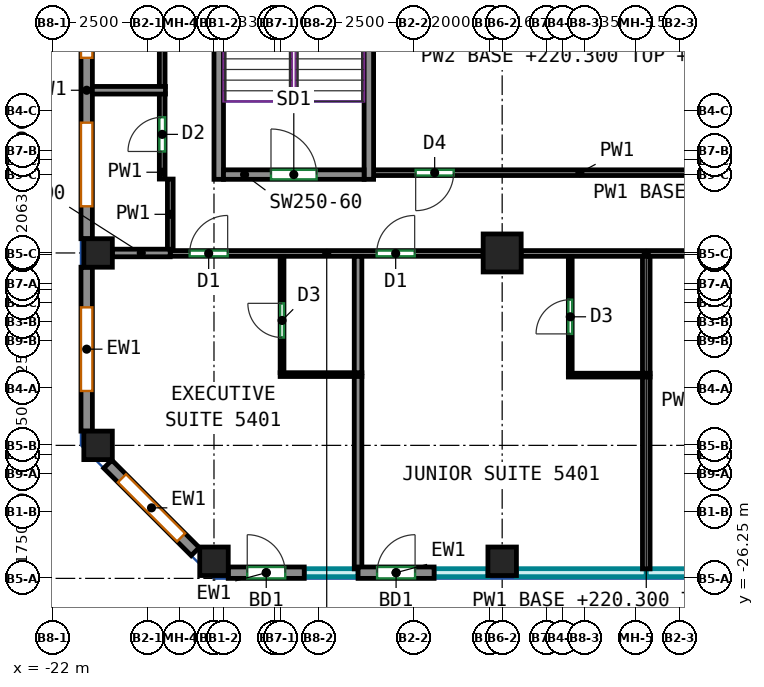
"""IFC4 building model, lengths in metres.
Left out: names, types, materials, properties, quantities, classifications, styles, units other than length and angle.
Written with IfcOpenShell. Run it as: python <this file> out.ifc"""

import sys

from ifc_helpers import new_model, si_unit, direction, frame, frame_2d, origin, origin_2d, place, context, subcontext, project, spatial, rectangle, extrude, source, transform, mapped, element, fill, save


model = new_model("IFC4")
c1 = context("Model", 3, precision=1e-05, world=origin(), true_north=direction((0.0, 1.0)))
c2 = subcontext(c1, "Body", "Model", "MODEL_VIEW")
j1 = project(units=[si_unit("LENGTHUNIT", "METRE"), si_unit("PLANEANGLEUNIT", "RADIAN")], contexts=[c1])
p1 = place(None, origin())
s1 = spatial("IfcSite", under=j1, at=p1, CompositionType="ELEMENT")
p2 = place(p1, origin())
s2 = spatial("IfcBuilding", under=s1, at=p2, CompositionType="ELEMENT")
p3 = place(p2, frame((0.0, 0.0, 220.3)))
s3 = spatial("IfcBuildingStorey", under=s2, at=p3, CompositionType="ELEMENT", Elevation=220.3)
m1 = source(origin(), c2, "Body", "SweptSolid", [
    extrude(rectangle(XDim=0.75, YDim=0.75, at=origin_2d()), origin(), (0.0, 0.0, 1.0), 3.0),
])
for number, where, z_axis, x_axis in (
    (1, (-20.8, -22.75, 0.0), (0.0, 0.0, 1.0), (1.0, 0.0, 0.0)),
    (2, (-20.8, -17.688, 0.0), (0.0, 0.0, 1.0), (1.0, 0.0, 0.0)),
    (3, (-17.75, -25.8, 0.0), (0.0, 0.0, 1.0), (1.0, 0.0, 0.0)),
    (4, (-10.167, -25.8, 0.0), (0.0, 0.0, 1.0), (1.0, 0.0, 0.0)),
):
    element("IfcColumn", number, at=place(p3, frame(where, z_axis=z_axis, x_axis=x_axis)), inside=s3, PredefinedType="COLUMN", context=c2, shape_type="MappedRepresentation", body=[
        mapped(m1, transform((0.0, 0.0, 0.0))),
    ])
m2 = source(origin(), c2, "Body", "SweptSolid", [
    extrude(rectangle(XDim=1.0, YDim=1.0, at=origin_2d()), origin(), (0.0, 0.0, 1.0), 3.0),
])
p4 = place(p3, frame((-10.167, -17.688, 0.0), z_axis=(0.0, 0.0, 1.0), x_axis=(1.0, 0.0, 0.0)))
e5 = element("IfcColumn", 5, at=p4, inside=s3, PredefinedType="COLUMN", context=c2, shape_type="MappedRepresentation", body=[
    mapped(m2, transform((0.0, 0.0, 0.0))),
])
m3 = source(origin(), c2, "Body", "SweptSolid", [
    extrude(rectangle(XDim=8.0, YDim=0.25, at=frame_2d((4.0, 0.0))), origin(), (0.0, 0.0, 1.0), 3.0),
])
for number, where, z_axis, x_axis in (
    (6, (-17.625, -15.75, 0.0), (0.0, 0.0, 1.0), (0.0, 1.0, 0.0)),
    (7, (-13.675, -15.75, 0.0), (0.0, 0.0, 1.0), (0.0, 1.0, 0.0)),
):
    element("IfcWall", number, at=place(p3, frame(where, z_axis=z_axis, x_axis=x_axis)), inside=s3, PredefinedType="SHEAR", context=c2, shape_type="MappedRepresentation", body=[
        mapped(m3, transform((0.0, 0.0, 0.0))),
    ])
m4 = source(origin(), c2, "Body", "SweptSolid", [
    extrude(rectangle(XDim=3.7, YDim=0.25, at=frame_2d((1.85, 0.0))), origin(), (0.0, 0.0, 1.0), 3.0),
])
p5 = place(p3, frame((-17.5, -15.625, 0.0), z_axis=(0.0, 0.0, 1.0), x_axis=(1.0, 0.0, 0.0)))
e8 = element("IfcWall", 8, at=p5, inside=s3, PredefinedType="SHEAR", context=c2, shape_type="MappedRepresentation", body=[
    mapped(m4, transform((0.0, 0.0, 0.0))),
])
p6 = place(p5, frame((1.25, 0.0, 0.0)))
e9 = element("IfcOpeningElement", 9, at=p6, cuts=e8, PredefinedType="OPENING", context=c2, shape_type="SweptSolid", body=[
    extrude(rectangle(XDim=1.2, YDim=2.1, at=frame_2d((0.6, 1.05))), frame((0.0, 0.135, 0.0), z_axis=(0.0, -1.0, 0.0), x_axis=(1.0, 0.0, 0.0)), (0.0, 0.0, 1.0), 0.27),
])
m5 = source(origin(), c2, "Body", "SweptSolid", [
    extrude(rectangle(XDim=2.0, YDim=0.3, at=frame_2d((1.0, 0.0))), origin(), (0.0, 0.0, 1.0), 3.0),
])
p7 = place(p3, frame((-17.375, -26.1, 0.0), z_axis=(0.0, 0.0, 1.0), x_axis=(1.0, 0.0, 0.0)))
e10 = element("IfcWall", 10, at=p7, inside=s3, PredefinedType="SOLIDWALL", context=c2, shape_type="MappedRepresentation", body=[
    mapped(m5, transform((0.0, 0.0, 0.0))),
])
p8 = place(p7, frame((0.5, 0.0, 0.0)))
e11 = element("IfcOpeningElement", 11, at=p8, cuts=e10, PredefinedType="OPENING", context=c2, shape_type="SweptSolid", body=[
    extrude(rectangle(XDim=1.0, YDim=2.1, at=frame_2d((0.5, 1.05))), frame((0.0, 0.16, 0.0), z_axis=(0.0, -1.0, 0.0), x_axis=(1.0, 0.0, 0.0)), (0.0, 0.0, 1.0), 0.32),
])
p9 = place(p3, frame((-13.958, -26.1, 0.0), z_axis=(0.0, 0.0, 1.0), x_axis=(1.0, 0.0, 0.0)))
e12 = element("IfcWall", 12, at=p9, inside=s3, PredefinedType="SOLIDWALL", context=c2, shape_type="MappedRepresentation", body=[
    mapped(m5, transform((0.0, 0.0, 0.0))),
])
p10 = place(p9, frame((0.5, 0.0, 0.0)))
e13 = element("IfcOpeningElement", 13, at=p10, cuts=e12, PredefinedType="OPENING", context=c2, shape_type="SweptSolid", body=[
    extrude(rectangle(XDim=1.0, YDim=2.1, at=frame_2d((0.5, 1.05))), frame((0.0, 0.16, 0.0), z_axis=(0.0, -1.0, 0.0), x_axis=(1.0, 0.0, 0.0)), (0.0, 0.0, 1.0), 0.32),
])
m6 = source(origin(), c2, "Body", "SweptSolid", [
    extrude(rectangle(XDim=7.812, YDim=0.3, at=frame_2d((3.906, 0.0))), origin(), (0.0, 0.0, 1.0), 3.0),
])
p11 = place(p3, frame((-21.1, -9.5, 0.0), z_axis=(0.0, 0.0, 1.0), x_axis=(0.0, -1.0, 0.0)))
e14 = element("IfcWall", 14, at=p11, inside=s3, PredefinedType="SOLIDWALL", context=c2, shape_type="MappedRepresentation", body=[
    mapped(m6, transform((0.0, 0.0, 0.0))),
])
p12 = place(p11, frame((0.853, 0.0, 0.85)))
e15 = element("IfcOpeningElement", 15, at=p12, cuts=e14, PredefinedType="OPENING", context=c2, shape_type="SweptSolid", body=[
    extrude(rectangle(XDim=2.2, YDim=1.95, at=frame_2d((1.1, 0.975))), frame((0.0, 0.16, 0.0), z_axis=(0.0, -1.0, 0.0), x_axis=(1.0, 0.0, 0.0)), (0.0, 0.0, 1.0), 0.32),
])
p13 = place(p11, frame((4.759, 0.0, 0.85)))
e16 = element("IfcOpeningElement", 16, at=p13, cuts=e14, PredefinedType="OPENING", context=c2, shape_type="SweptSolid", body=[
    extrude(rectangle(XDim=2.2, YDim=1.95, at=frame_2d((1.1, 0.975))), frame((0.0, 0.16, 0.0), z_axis=(0.0, -1.0, 0.0), x_axis=(1.0, 0.0, 0.0)), (0.0, 0.0, 1.0), 0.32),
])
m7 = source(origin(), c2, "Body", "SweptSolid", [
    extrude(rectangle(XDim=4.312, YDim=0.3, at=frame_2d((2.156, 0.0))), origin(), (0.0, 0.0, 1.0), 3.0),
])
p14 = place(p3, frame((-21.1, -18.062, 0.0), z_axis=(0.0, 0.0, 1.0), x_axis=(0.0, -1.0, 0.0)))
e17 = element("IfcWall", 17, at=p14, inside=s3, PredefinedType="SOLIDWALL", context=c2, shape_type="MappedRepresentation", body=[
    mapped(m7, transform((0.0, 0.0, 0.0))),
])
p15 = place(p14, frame((1.056, 0.0, 0.85)))
e18 = element("IfcOpeningElement", 18, at=p15, cuts=e17, PredefinedType="OPENING", context=c2, shape_type="SweptSolid", body=[
    extrude(rectangle(XDim=2.2, YDim=1.95, at=frame_2d((1.1, 0.975))), frame((0.0, 0.16, 0.0), z_axis=(0.0, -1.0, 0.0), x_axis=(1.0, 0.0, 0.0)), (0.0, 0.0, 1.0), 0.32),
])
m8 = source(origin(), c2, "Body", "SweptSolid", [
    extrude(rectangle(XDim=3.253, YDim=0.3, at=frame_2d((1.626, 0.0))), origin(), (0.0, 0.0, 1.0), 3.0),
])
p16 = place(p3, frame((-20.544, -23.244, 0.0), z_axis=(0.0, 0.0, 1.0), x_axis=(0.707106781187, -0.707106781187, 0.0)))
e19 = element("IfcWall", 19, at=p16, inside=s3, PredefinedType="SOLIDWALL", context=c2, shape_type="MappedRepresentation", body=[
    mapped(m8, transform((0.0, 0.0, 0.0))),
])
p17 = place(p16, frame((0.526, 0.0, 0.85)))
e20 = element("IfcOpeningElement", 20, at=p17, cuts=e19, PredefinedType="OPENING", context=c2, shape_type="SweptSolid", body=[
    extrude(rectangle(XDim=2.2, YDim=1.95, at=frame_2d((1.1, 0.975))), frame((0.0, 0.16, 0.0), z_axis=(0.0, -1.0, 0.0), x_axis=(1.0, 0.0, 0.0)), (0.0, 0.0, 1.0), 0.32),
])
p18 = place(p3, frame((-18.9, -17.7, 0.0), z_axis=(0.0, 0.0, 1.0), x_axis=(1.0, 0.0, 0.0)))
e21 = element("IfcWall", 21, at=p18, inside=s3, PredefinedType="PARTITIONING", context=c2, shape_type="SweptSolid", body=[
    extrude(rectangle(XDim=8.233, YDim=0.15, at=frame_2d((4.116, 0.0))), origin(), (0.0, 0.0, 1.0), 2.4),
])
p19 = place(p18, frame((0.51, 0.0, 0.0)))
e22 = element("IfcOpeningElement", 22, at=p19, cuts=e21, PredefinedType="OPENING", context=c2, shape_type="SweptSolid", body=[
    extrude(rectangle(XDim=1.0, YDim=2.1, at=frame_2d((0.5, 1.05))), frame((0.0, 0.085, 0.0), z_axis=(0.0, -1.0, 0.0), x_axis=(1.0, 0.0, 0.0)), (0.0, 0.0, 1.0), 0.17),
])
p20 = place(p18, frame((5.431, 0.0, 0.0)))
e23 = element("IfcOpeningElement", 23, at=p20, cuts=e21, PredefinedType="OPENING", context=c2, shape_type="SweptSolid", body=[
    extrude(rectangle(XDim=1.0, YDim=2.1, at=frame_2d((0.5, 1.05))), frame((0.0, 0.085, 0.0), z_axis=(0.0, -1.0, 0.0), x_axis=(1.0, 0.0, 0.0)), (0.0, 0.0, 1.0), 0.17),
])
p21 = place(p3, frame((-9.667, -17.7, 0.0), z_axis=(0.0, 0.0, 1.0), x_axis=(1.0, 0.0, 0.0)))
e24 = element("IfcWall", 24, at=p21, inside=s3, PredefinedType="PARTITIONING", context=c2, shape_type="SweptSolid", body=[
    extrude(rectangle(XDim=6.584, YDim=0.15, at=frame_2d((3.292, 0.0))), origin(), (0.0, 0.0, 1.0), 2.4),
])
p22 = place(p3, frame((-18.9, -17.598, 0.0), z_axis=(0.0, 0.0, 1.0), x_axis=(0.0, 1.0, 0.0)))
e25 = element("IfcWall", 25, at=p22, inside=s3, PredefinedType="PARTITIONING", context=c2, shape_type="SweptSolid", body=[
    extrude(rectangle(XDim=1.855, YDim=0.15, at=frame_2d((0.927, 0.0))), origin(), (0.0, 0.0, 1.0), 3.0),
])
p23 = place(p3, frame((-19.113, -15.743, 0.0), z_axis=(0.0, 0.0, 1.0), x_axis=(0.0, 1.0, 0.0)))
e26 = element("IfcWall", 26, at=p23, inside=s3, PredefinedType="PARTITIONING", context=c2, shape_type="SweptSolid", body=[
    extrude(rectangle(XDim=2.247, YDim=0.15, at=frame_2d((1.124, 0.0))), origin(), (0.0, 0.0, 1.0), 3.0),
])
p24 = place(p23, frame((0.726, 0.0, 0.0)))
e27 = element("IfcOpeningElement", 27, at=p24, cuts=e26, PredefinedType="OPENING", context=c2, shape_type="SweptSolid", body=[
    extrude(rectangle(XDim=0.9, YDim=2.1, at=frame_2d((0.45, 1.05))), frame((0.0, 0.085, 0.0), z_axis=(0.0, -1.0, 0.0), x_axis=(1.0, 0.0, 0.0)), (0.0, 0.0, 1.0), 0.17),
])
p25 = place(p3, frame((-19.113, -13.316, 0.0), z_axis=(0.0, 0.0, 1.0), x_axis=(0.0, 1.0, 0.0)))
e28 = element("IfcWall", 28, at=p25, inside=s3, PredefinedType="PARTITIONING", context=c2, shape_type="SweptSolid", body=[
    extrude(rectangle(XDim=4.101, YDim=0.15, at=frame_2d((2.05, 0.0))), origin(), (0.0, 0.0, 1.0), 3.0),
])
p26 = place(p25, frame((1.4, 0.0, 0.0)))
e29 = element("IfcOpeningElement", 29, at=p26, cuts=e28, PredefinedType="OPENING", context=c2, shape_type="SweptSolid", body=[
    extrude(rectangle(XDim=0.9, YDim=2.1, at=frame_2d((0.45, 1.05))), frame((0.0, 0.085, 0.0), z_axis=(0.0, -1.0, 0.0), x_axis=(1.0, 0.0, 0.0)), (0.0, 0.0, 1.0), 0.17),
])
p27 = place(p3, frame((-2.693, -15.575, 0.0), z_axis=(0.0, 0.0, 1.0), x_axis=(-1.0, 0.0, 0.0)))
e30 = element("IfcWall", 30, at=p27, inside=s3, PredefinedType="PARTITIONING", context=c2, shape_type="SweptSolid", body=[
    extrude(rectangle(XDim=10.857, YDim=0.15, at=frame_2d((5.428, 0.0))), origin(), (0.0, 0.0, 1.0), 3.0),
])
p28 = place(p27, frame((8.75, 0.0, 0.0)))
e31 = element("IfcOpeningElement", 31, at=p28, cuts=e30, PredefinedType="OPENING", context=c2, shape_type="SweptSolid", body=[
    extrude(rectangle(XDim=1.0, YDim=2.1, at=frame_2d((0.5, 1.05))), frame((0.0, 0.085, 0.0), z_axis=(0.0, -1.0, 0.0), x_axis=(1.0, 0.0, 0.0)), (0.0, 0.0, 1.0), 0.17),
])
p29 = place(p3, frame((-15.959, -20.838, 0.0), z_axis=(0.0, 0.0, 1.0), x_axis=(0.0, 1.0, 0.0)))
e32 = element("IfcWall", 32, at=p29, inside=s3, PredefinedType="PARTITIONING", context=c2, shape_type="SweptSolid", body=[
    extrude(rectangle(XDim=3.061, YDim=0.1, at=frame_2d((1.53, 0.0))), origin(), (0.0, 0.0, 1.0), 3.0),
])
p30 = place(p29, frame((0.925, 0.0, 0.0)))
e33 = element("IfcOpeningElement", 33, at=p30, cuts=e32, PredefinedType="OPENING", context=c2, shape_type="SweptSolid", body=[
    extrude(rectangle(XDim=0.9, YDim=2.1, at=frame_2d((0.45, 1.05))), frame((0.0, 0.06, 0.0), z_axis=(0.0, -1.0, 0.0), x_axis=(1.0, 0.0, 0.0)), (0.0, 0.0, 1.0), 0.12),
])
p31 = place(p3, frame((-16.009, -20.888, 0.0), z_axis=(0.0, 0.0, 1.0), x_axis=(1.0, 0.0, 0.0)))
e34 = element("IfcWall", 34, at=p31, inside=s3, PredefinedType="PARTITIONING", context=c2, shape_type="SweptSolid", body=[
    extrude(rectangle(XDim=2.15, YDim=0.1, at=frame_2d((1.075, 0.0))), origin(), (0.0, 0.0, 1.0), 3.0),
])
p32 = place(p3, frame((-13.959, -26.0, 0.0), z_axis=(0.0, 0.0, 1.0), x_axis=(0.0, 1.0, 0.0)))
e35 = element("IfcWall", 35, at=p32, inside=s3, PredefinedType="PARTITIONING", context=c2, shape_type="SweptSolid", body=[
    extrude(rectangle(XDim=5.062, YDim=0.2, at=frame_2d((2.531, 0.0))), origin(), (0.0, 0.0, 1.0), 3.0),
])
p33 = place(p3, frame((-20.425, -17.688, 0.0), z_axis=(0.0, 0.0, 1.0), x_axis=(1.0, 0.0, 0.0)))
e36 = element("IfcWall", 36, at=p33, inside=s3, PredefinedType="PARTITIONING", context=c2, shape_type="SweptSolid", body=[
    extrude(rectangle(XDim=1.523, YDim=0.2, at=frame_2d((0.761, 0.0))), origin(), (0.0, 0.0, 1.0), 2.4),
])
p34 = place(p3, frame((-13.959, -20.838, 0.0), z_axis=(0.0, 0.0, 1.0), x_axis=(0.0, 1.0, 0.0)))
e37 = element("IfcWall", 37, at=p34, inside=s3, PredefinedType="PARTITIONING", context=c2, shape_type="SweptSolid", body=[
    extrude(rectangle(XDim=3.061, YDim=0.2, at=frame_2d((1.53, 0.0))), origin(), (0.0, 0.0, 1.0), 3.0),
])
p35 = place(p3, frame((-8.375, -20.852, 0.0), z_axis=(0.0, 0.0, 1.0), x_axis=(0.0, 1.0, 0.0)))
e38 = element("IfcWall", 38, at=p35, inside=s3, PredefinedType="PARTITIONING", context=c2, shape_type="SweptSolid", body=[
    extrude(rectangle(XDim=3.075, YDim=0.1, at=frame_2d((1.538, 0.0))), origin(), (0.0, 0.0, 1.0), 3.0),
])
p36 = place(p35, frame((1.035, 0.0, 0.0)))
e39 = element("IfcOpeningElement", 39, at=p36, cuts=e38, PredefinedType="OPENING", context=c2, shape_type="SweptSolid", body=[
    extrude(rectangle(XDim=0.9, YDim=2.1, at=frame_2d((0.45, 1.05))), frame((0.0, 0.06, 0.0), z_axis=(0.0, -1.0, 0.0), x_axis=(1.0, 0.0, 0.0)), (0.0, 0.0, 1.0), 0.12),
])
p37 = place(p3, frame((-8.425, -20.902, 0.0), z_axis=(0.0, 0.0, 1.0), x_axis=(1.0, 0.0, 0.0)))
e40 = element("IfcWall", 40, at=p37, inside=s3, PredefinedType="PARTITIONING", context=c2, shape_type="SweptSolid", body=[
    extrude(rectangle(XDim=2.15, YDim=0.1, at=frame_2d((1.075, 0.0))), origin(), (0.0, 0.0, 1.0), 3.0),
])
p38 = place(p3, frame((-6.375, -26.0, 0.0), z_axis=(0.0, 0.0, 1.0), x_axis=(0.0, 1.0, 0.0)))
e41 = element("IfcWall", 41, at=p38, inside=s3, PredefinedType="PARTITIONING", context=c2, shape_type="SweptSolid", body=[
    extrude(rectangle(XDim=5.048, YDim=0.2, at=frame_2d((2.524, 0.0))), origin(), (0.0, 0.0, 1.0), 3.0),
])
p39 = place(p3, frame((-6.375, -20.852, 0.0), z_axis=(0.0, 0.0, 1.0), x_axis=(0.0, 1.0, 0.0)))
e42 = element("IfcWall", 42, at=p39, inside=s3, PredefinedType="PARTITIONING", context=c2, shape_type="SweptSolid", body=[
    extrude(rectangle(XDim=3.075, YDim=0.2, at=frame_2d((1.538, 0.0))), origin(), (0.0, 0.0, 1.0), 3.0),
])
p40 = place(p3, frame((-19.027, -13.406, 0.0), z_axis=(0.0, 0.0, 1.0), x_axis=(-1.0, 0.0, 0.0)))
e43 = element("IfcWall", 43, at=p40, inside=s3, PredefinedType="PARTITIONING", context=c2, shape_type="SweptSolid", body=[
    extrude(rectangle(XDim=1.973, YDim=0.2, at=frame_2d((0.986, 0.0))), origin(), (0.0, 0.0, 1.0), 3.0),
])
p41 = place(p8, origin())
e44 = element("IfcDoor", 44, at=p41, inside=s3, OperationType="SINGLE_SWING_LEFT", PredefinedType="DOOR", context=c2, shape_type="SweptSolid", body=[
    extrude(rectangle(XDim=1.0, YDim=2.1, at=frame_2d((0.5, 1.05))), frame((0.0, 0.025, 0.0), z_axis=(0.0, -1.0, 0.0), x_axis=(1.0, 0.0, 0.0)), (0.0, 0.0, 1.0), 0.05),
])
fill(e11, e44)
p42 = place(p10, origin())
e45 = element("IfcDoor", 45, at=p42, inside=s3, OperationType="SINGLE_SWING_RIGHT", PredefinedType="DOOR", context=c2, shape_type="SweptSolid", body=[
    extrude(rectangle(XDim=1.0, YDim=2.1, at=frame_2d((0.5, 1.05))), frame((0.0, 0.025, 0.0), z_axis=(0.0, -1.0, 0.0), x_axis=(1.0, 0.0, 0.0)), (0.0, 0.0, 1.0), 0.05),
])
fill(e13, e45)
p43 = place(p12, origin())
e46 = element("IfcWindow", 46, at=p43, inside=s3, PartitioningType="SINGLE_PANEL", PredefinedType="WINDOW", context=c2, shape_type="SweptSolid", body=[
    extrude(rectangle(XDim=2.2, YDim=1.95, at=frame_2d((1.1, 0.975))), frame((0.0, 0.03, 0.0), z_axis=(0.0, -1.0, 0.0), x_axis=(1.0, 0.0, 0.0)), (0.0, 0.0, 1.0), 0.06),
])
fill(e15, e46)
p44 = place(p13, origin())
e47 = element("IfcWindow", 47, at=p44, inside=s3, PartitioningType="SINGLE_PANEL", PredefinedType="WINDOW", context=c2, shape_type="SweptSolid", body=[
    extrude(rectangle(XDim=2.2, YDim=1.95, at=frame_2d((1.1, 0.975))), frame((0.0, 0.03, 0.0), z_axis=(0.0, -1.0, 0.0), x_axis=(1.0, 0.0, 0.0)), (0.0, 0.0, 1.0), 0.06),
])
fill(e16, e47)
p45 = place(p15, origin())
e48 = element("IfcWindow", 48, at=p45, inside=s3, PartitioningType="SINGLE_PANEL", PredefinedType="WINDOW", context=c2, shape_type="SweptSolid", body=[
    extrude(rectangle(XDim=2.2, YDim=1.95, at=frame_2d((1.1, 0.975))), frame((0.0, 0.03, 0.0), z_axis=(0.0, -1.0, 0.0), x_axis=(1.0, 0.0, 0.0)), (0.0, 0.0, 1.0), 0.06),
])
fill(e18, e48)
p46 = place(p17, origin())
e49 = element("IfcWindow", 49, at=p46, inside=s3, PartitioningType="SINGLE_PANEL", PredefinedType="WINDOW", context=c2, shape_type="SweptSolid", body=[
    extrude(rectangle(XDim=2.2, YDim=1.95, at=frame_2d((1.1, 0.975))), frame((0.0, 0.03, 0.0), z_axis=(0.0, -1.0, 0.0), x_axis=(1.0, 0.0, 0.0)), (0.0, 0.0, 1.0), 0.06),
])
fill(e20, e49)
p47 = place(p6, origin())
e50 = element("IfcDoor", 50, at=p47, inside=s3, OperationType="DOUBLE_DOOR_SINGLE_SWING", PredefinedType="DOOR", context=c2, shape_type="SweptSolid", body=[
    extrude(rectangle(XDim=1.2, YDim=2.1, at=frame_2d((0.6, 1.05))), frame((0.0, 0.025, 0.0), z_axis=(0.0, -1.0, 0.0), x_axis=(1.0, 0.0, 0.0)), (0.0, 0.0, 1.0), 0.05),
])
fill(e9, e50)
p48 = place(p30, origin())
e51 = element("IfcDoor", 51, at=p48, inside=s3, OperationType="SINGLE_SWING_RIGHT", PredefinedType="DOOR", context=c2, shape_type="SweptSolid", body=[
    extrude(rectangle(XDim=0.9, YDim=2.1, at=frame_2d((0.45, 1.05))), frame((0.0, 0.025, 0.0), z_axis=(0.0, -1.0, 0.0), x_axis=(1.0, 0.0, 0.0)), (0.0, 0.0, 1.0), 0.05),
])
fill(e33, e51)
p49 = place(p36, origin())
e52 = element("IfcDoor", 52, at=p49, inside=s3, OperationType="SINGLE_SWING_LEFT", PredefinedType="DOOR", context=c2, shape_type="SweptSolid", body=[
    extrude(rectangle(XDim=0.9, YDim=2.1, at=frame_2d((0.45, 1.05))), frame((0.0, 0.025, 0.0), z_axis=(0.0, -1.0, 0.0), x_axis=(1.0, 0.0, 0.0)), (0.0, 0.0, 1.0), 0.05),
])
fill(e39, e52)
p50 = place(p19, origin())
e53 = element("IfcDoor", 53, at=p50, inside=s3, OperationType="SINGLE_SWING_RIGHT", PredefinedType="DOOR", context=c2, shape_type="SweptSolid", body=[
    extrude(rectangle(XDim=1.0, YDim=2.1, at=frame_2d((0.5, 1.05))), frame((0.0, 0.025, 0.0), z_axis=(0.0, -1.0, 0.0), x_axis=(1.0, 0.0, 0.0)), (0.0, 0.0, 1.0), 0.05),
])
fill(e22, e53)
p51 = place(p20, origin())
e54 = element("IfcDoor", 54, at=p51, inside=s3, OperationType="SINGLE_SWING_RIGHT", PredefinedType="DOOR", context=c2, shape_type="SweptSolid", body=[
    extrude(rectangle(XDim=1.0, YDim=2.1, at=frame_2d((0.5, 1.05))), frame((0.0, 0.025, 0.0), z_axis=(0.0, -1.0, 0.0), x_axis=(1.0, 0.0, 0.0)), (0.0, 0.0, 1.0), 0.05),
])
fill(e23, e54)
p52 = place(p28, origin())
e55 = element("IfcDoor", 55, at=p52, inside=s3, OperationType="SINGLE_SWING_RIGHT", PredefinedType="DOOR", context=c2, shape_type="SweptSolid", body=[
    extrude(rectangle(XDim=1.0, YDim=2.1, at=frame_2d((0.5, 1.05))), frame((0.0, 0.025, 0.0), z_axis=(0.0, -1.0, 0.0), x_axis=(1.0, 0.0, 0.0)), (0.0, 0.0, 1.0), 0.05),
])
fill(e31, e55)
p53 = place(p24, origin())
e56 = element("IfcDoor", 56, at=p53, inside=s3, OperationType="SINGLE_SWING_LEFT", PredefinedType="DOOR", context=c2, shape_type="SweptSolid", body=[
    extrude(rectangle(XDim=0.9, YDim=2.1, at=frame_2d((0.45, 1.05))), frame((0.0, 0.025, 0.0), z_axis=(0.0, -1.0, 0.0), x_axis=(1.0, 0.0, 0.0)), (0.0, 0.0, 1.0), 0.05),
])
fill(e27, e56)
save(model, sys.argv[1])
